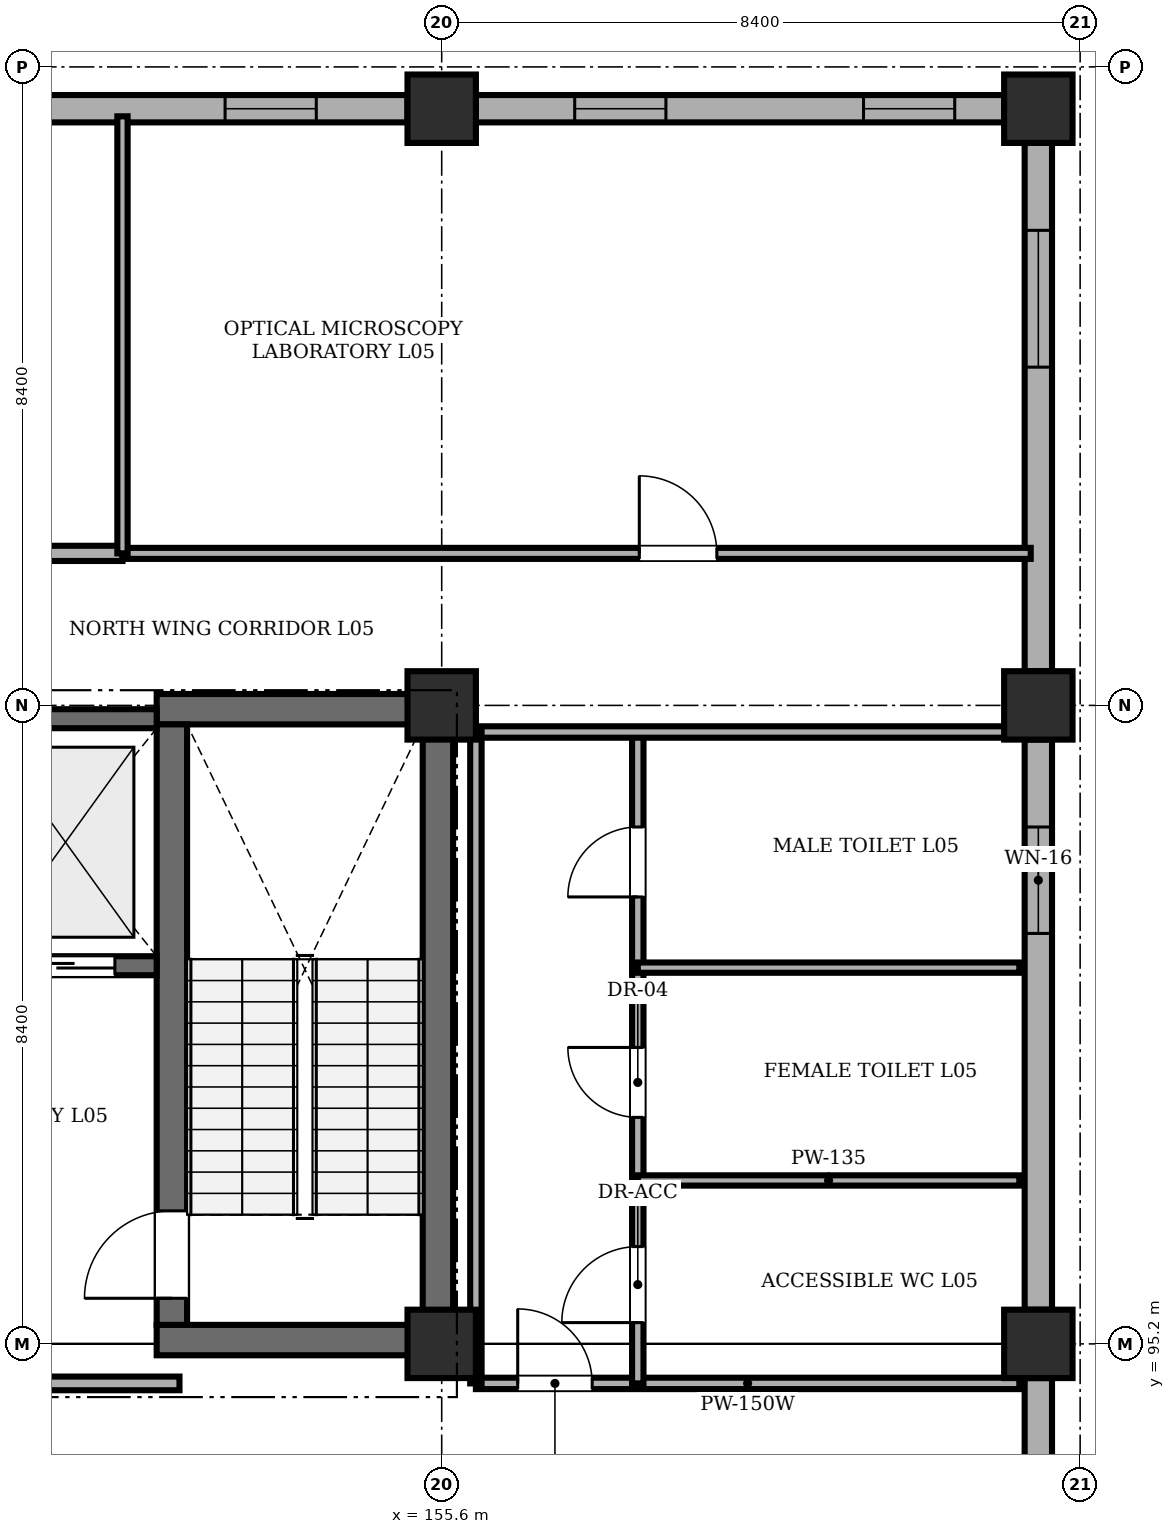
"""IFC4 building model, lengths in metres.
Left out: names, types, materials, properties, quantities, classifications, styles, units other than length and angle.
Written with IfcOpenShell. Run it as: python <this file> out.ifc"""

import sys

from ifc_helpers import new_model, si_unit, direction, frame, frame_2d, origin, origin_2d, place, context, subcontext, project, spatial, rectangle, extrude, element, fill, save


model = new_model("IFC4")
c1 = context("Model", 3, precision=1e-05, world=origin(), true_north=direction((0.0, 1.0)))
c2 = subcontext(c1, "Body", "Model", "MODEL_VIEW")
j1 = project(units=[si_unit("LENGTHUNIT", "METRE"), si_unit("PLANEANGLEUNIT", "RADIAN")], contexts=[c1])
p1 = place(None, origin())
s1 = spatial("IfcSite", under=j1, at=p1, CompositionType="ELEMENT")
p2 = place(p1, origin())
s2 = spatial("IfcBuilding", under=s1, at=p2, CompositionType="ELEMENT")
p3 = place(p2, frame((0.0, 0.0, 19.2)))
s3 = spatial("IfcBuildingStorey", under=s2, at=p3, CompositionType="ELEMENT", Elevation=19.2)
for number, where, z_axis, x_axis in (
    (1, (155.6, 95.2, 0.0), (0.0, 0.0, 1.0), (1.0, 0.0, 0.0)),
    (2, (155.6, 103.6, 0.0), (0.0, 0.0, 1.0), (1.0, 0.0, 0.0)),
    (3, (155.6, 111.45, 0.0), (0.0, 0.0, 1.0), (1.0, 0.0, 0.0)),
    (4, (163.45, 95.2, 0.0), (0.0, 0.0, 1.0), (1.0, 0.0, 0.0)),
    (5, (163.45, 103.6, 0.0), (0.0, 0.0, 1.0), (1.0, 0.0, 0.0)),
    (6, (163.45, 111.45, 0.0), (0.0, 0.0, 1.0), (1.0, 0.0, 0.0)),
):
    element("IfcColumn", number, at=place(p3, frame(where, z_axis=z_axis, x_axis=x_axis)), inside=s3, PredefinedType="COLUMN", context=c2, shape_type="SweptSolid", body=[
        extrude(rectangle(XDim=0.9, YDim=0.9, at=origin_2d()), origin(), (0.0, 0.0, 1.0), 4.02),
    ])
for number, where, z_axis, x_axis in (
    (7, (151.85, 95.25, 0.0), (0.0, 0.0, 1.0), (1.0, 0.0, 0.0)),
    (8, (151.85, 103.55, 0.0), (0.0, 0.0, 1.0), (1.0, 0.0, 0.0)),
):
    element("IfcWall", number, at=place(p3, frame(where, z_axis=z_axis, x_axis=x_axis)), inside=s3, PredefinedType="SHEAR", context=c2, shape_type="SweptSolid", body=[
        extrude(rectangle(XDim=3.9, YDim=0.4, at=frame_2d((1.95, 0.0))), origin(), (0.0, 0.0, 1.0), 4.02),
    ])
p4 = place(p3, frame((152.05, 95.45, 0.0), z_axis=(0.0, 0.0, 1.0), x_axis=(0.0, 1.0, 0.0)))
e9 = element("IfcWall", 9, at=p4, inside=s3, PredefinedType="SHEAR", context=c2, shape_type="SweptSolid", body=[
    extrude(rectangle(XDim=7.9, YDim=0.4, at=frame_2d((3.95, 0.0))), origin(), (0.0, 0.0, 1.0), 4.02),
])
p5 = place(p4, frame((0.35, 0.0, 0.0)))
e10 = element("IfcOpeningElement", 10, at=p5, cuts=e9, PredefinedType="OPENING", context=c2, shape_type="SweptSolid", body=[
    extrude(rectangle(XDim=1.15, YDim=2.15, at=frame_2d((0.575, 1.075))), frame((0.0, 0.21, 0.0), z_axis=(0.0, -1.0, 0.0), x_axis=(1.0, 0.0, 0.0)), (0.0, 0.0, 1.0), 0.42),
])
p6 = place(p3, frame((155.55, 95.45, 0.0), z_axis=(0.0, 0.0, 1.0), x_axis=(0.0, 1.0, 0.0)))
e11 = element("IfcWall", 11, at=p6, inside=s3, PredefinedType="SHEAR", context=c2, shape_type="SweptSolid", body=[
    extrude(rectangle(XDim=7.9, YDim=0.4, at=frame_2d((3.95, 0.0))), origin(), (0.0, 0.0, 1.0), 4.02),
])
p7 = place(p3, frame((149.45, 100.175, 0.0), z_axis=(0.0, 0.0, 1.0), x_axis=(1.0, 0.0, 0.0)))
e12 = element("IfcWall", 12, at=p7, inside=s3, PredefinedType="SHEAR", context=c2, shape_type="SweptSolid", body=[
    extrude(rectangle(XDim=2.4, YDim=0.25, at=frame_2d((1.2, 0.0))), origin(), (0.0, 0.0, 1.0), 4.02),
])
p8 = place(p7, frame((0.55, 0.0, 0.0)))
e13 = element("IfcOpeningElement", 13, at=p8, cuts=e12, PredefinedType="OPENING", context=c2, shape_type="SweptSolid", body=[
    extrude(rectangle(XDim=1.3, YDim=2.25, at=frame_2d((0.65, 1.125))), frame((0.0, 0.135, 0.0), z_axis=(0.0, -1.0, 0.0), x_axis=(1.0, 0.0, 0.0)), (0.0, 0.0, 1.0), 0.27),
])
p9 = place(p3, frame((149.45, 103.425, 0.0), z_axis=(0.0, 0.0, 1.0), x_axis=(1.0, 0.0, 0.0)))
e14 = element("IfcWall", 14, at=p9, inside=s3, PredefinedType="SHEAR", context=c2, shape_type="SweptSolid", body=[
    extrude(rectangle(XDim=2.4, YDim=0.25, at=frame_2d((1.2, 0.0))), origin(), (0.0, 0.0, 1.0), 4.02),
])
p10 = place(p3, frame((147.65, 111.45, 0.0), z_axis=(0.0, 0.0, 1.0), x_axis=(1.0, 0.0, 0.0)))
e15 = element("IfcWall", 15, at=p10, inside=s3, PredefinedType="STANDARD", context=c2, shape_type="SweptSolid", body=[
    extrude(rectangle(XDim=7.5, YDim=0.36, at=frame_2d((3.75, 0.0))), origin(), (0.0, 0.0, 1.0), 3.32),
])
p11 = place(p10, frame((1.3, 0.0, 1.1)))
e16 = element("IfcOpeningElement", 16, at=p11, cuts=e15, PredefinedType="OPENING", context=c2, shape_type="SweptSolid", body=[
    extrude(rectangle(XDim=1.2, YDim=1.5, at=frame_2d((0.6, 0.75))), frame((0.0, 0.19, 0.0), z_axis=(0.0, -1.0, 0.0), x_axis=(1.0, 0.0, 0.0)), (0.0, 0.0, 1.0), 0.38),
])
p12 = place(p10, frame((5.1, 0.0, 1.1)))
e17 = element("IfcOpeningElement", 17, at=p12, cuts=e15, PredefinedType="OPENING", context=c2, shape_type="SweptSolid", body=[
    extrude(rectangle(XDim=1.2, YDim=1.5, at=frame_2d((0.6, 0.75))), frame((0.0, 0.19, 0.0), z_axis=(0.0, -1.0, 0.0), x_axis=(1.0, 0.0, 0.0)), (0.0, 0.0, 1.0), 0.38),
])
p13 = place(p3, frame((156.05, 111.45, 0.0), z_axis=(0.0, 0.0, 1.0), x_axis=(1.0, 0.0, 0.0)))
e18 = element("IfcWall", 18, at=p13, inside=s3, PredefinedType="STANDARD", context=c2, shape_type="SweptSolid", body=[
    extrude(rectangle(XDim=6.95, YDim=0.36, at=frame_2d((3.475, 0.0))), origin(), (0.0, 0.0, 1.0), 3.32),
])
p14 = place(p13, frame((1.3, 0.0, 1.1)))
e19 = element("IfcOpeningElement", 19, at=p14, cuts=e18, PredefinedType="OPENING", context=c2, shape_type="SweptSolid", body=[
    extrude(rectangle(XDim=1.2, YDim=1.5, at=frame_2d((0.6, 0.75))), frame((0.0, 0.19, 0.0), z_axis=(0.0, -1.0, 0.0), x_axis=(1.0, 0.0, 0.0)), (0.0, 0.0, 1.0), 0.38),
])
p15 = place(p13, frame((5.1, 0.0, 1.1)))
e20 = element("IfcOpeningElement", 20, at=p15, cuts=e18, PredefinedType="OPENING", context=c2, shape_type="SweptSolid", body=[
    extrude(rectangle(XDim=1.2, YDim=1.5, at=frame_2d((0.6, 0.75))), frame((0.0, 0.19, 0.0), z_axis=(0.0, -1.0, 0.0), x_axis=(1.0, 0.0, 0.0)), (0.0, 0.0, 1.0), 0.38),
])
p16 = place(p3, frame((163.45, 94.75, 0.0), z_axis=(0.0, 0.0, 1.0), x_axis=(0.0, -1.0, 0.0)))
e21 = element("IfcWall", 21, at=p16, inside=s3, PredefinedType="STANDARD", context=c2, shape_type="SweptSolid", body=[
    extrude(rectangle(XDim=7.5, YDim=0.36, at=frame_2d((3.75, 0.0))), origin(), (0.0, 0.0, 1.0), 3.32),
])
p17 = place(p16, frame((4.2, 0.0, 1.1)))
e22 = element("IfcOpeningElement", 22, at=p17, cuts=e21, PredefinedType="OPENING", context=c2, shape_type="SweptSolid", body=[
    extrude(rectangle(XDim=1.8, YDim=1.8, at=frame_2d((0.9, 0.9))), frame((0.0, 0.19, 0.0), z_axis=(0.0, -1.0, 0.0), x_axis=(1.0, 0.0, 0.0)), (0.0, 0.0, 1.0), 0.38),
])
p18 = place(p3, frame((163.45, 103.15, 0.0), z_axis=(0.0, 0.0, 1.0), x_axis=(0.0, -1.0, 0.0)))
e23 = element("IfcWall", 23, at=p18, inside=s3, PredefinedType="STANDARD", context=c2, shape_type="SweptSolid", body=[
    extrude(rectangle(XDim=7.5, YDim=0.36, at=frame_2d((3.75, 0.0))), origin(), (0.0, 0.0, 1.0), 3.32),
])
p19 = place(p18, frame((1.15, 0.0, 1.1)))
e24 = element("IfcOpeningElement", 24, at=p19, cuts=e23, PredefinedType="OPENING", context=c2, shape_type="SweptSolid", body=[
    extrude(rectangle(XDim=1.4, YDim=1.4, at=frame_2d((0.7, 0.7))), frame((0.0, 0.19, 0.0), z_axis=(0.0, -1.0, 0.0), x_axis=(1.0, 0.0, 0.0)), (0.0, 0.0, 1.0), 0.38),
])
p20 = place(p3, frame((163.45, 111.0, 0.0), z_axis=(0.0, 0.0, 1.0), x_axis=(0.0, -1.0, 0.0)))
e25 = element("IfcWall", 25, at=p20, inside=s3, PredefinedType="STANDARD", context=c2, shape_type="SweptSolid", body=[
    extrude(rectangle(XDim=6.95, YDim=0.36, at=frame_2d((3.475, 0.0))), origin(), (0.0, 0.0, 1.0), 3.32),
])
p21 = place(p20, frame((1.15, 0.0, 1.1)))
e26 = element("IfcOpeningElement", 26, at=p21, cuts=e25, PredefinedType="OPENING", context=c2, shape_type="SweptSolid", body=[
    extrude(rectangle(XDim=1.8, YDim=1.8, at=frame_2d((0.9, 0.9))), frame((0.0, 0.19, 0.0), z_axis=(0.0, -1.0, 0.0), x_axis=(1.0, 0.0, 0.0)), (0.0, 0.0, 1.0), 0.38),
])
p22 = place(p3, frame((147.3, 94.68, 0.0), z_axis=(0.0, 0.0, 1.0), x_axis=(1.0, 0.0, 0.0)))
e27 = element("IfcWall", 27, at=p22, inside=s3, PredefinedType="STANDARD", context=c2, shape_type="SweptSolid", body=[
    extrude(rectangle(XDim=4.85, YDim=0.18, at=frame_2d((2.425, 0.0))), origin(), (0.0, 0.0, 1.0), 4.02),
])
p23 = place(p22, frame((1.6, 0.0, 0.0)))
e28 = element("IfcOpeningElement", 28, at=p23, cuts=e27, PredefinedType="OPENING", context=c2, shape_type="SweptSolid", body=[
    extrude(rectangle(XDim=1.15, YDim=2.15, at=frame_2d((0.575, 1.075))), frame((0.0, 0.1, 0.0), z_axis=(0.0, -1.0, 0.0), x_axis=(1.0, 0.0, 0.0)), (0.0, 0.0, 1.0), 0.2),
])
p24 = place(p3, frame((156.05, 94.68, 0.0), z_axis=(0.0, 0.0, 1.0), x_axis=(1.0, 0.0, 0.0)))
e29 = element("IfcWall", 29, at=p24, inside=s3, PredefinedType="PARTITIONING", context=c2, shape_type="SweptSolid", body=[
    extrude(rectangle(XDim=7.15, YDim=0.15, at=frame_2d((3.575, 0.0))), origin(), (0.0, 0.0, 1.0), 4.02),
])
p25 = place(p24, frame((0.55, 0.0, 0.0)))
e30 = element("IfcOpeningElement", 30, at=p25, cuts=e29, PredefinedType="OPENING", context=c2, shape_type="SweptSolid", body=[
    extrude(rectangle(XDim=0.98, YDim=2.12, at=frame_2d((0.49, 1.06))), frame((0.0, 0.085, 0.0), z_axis=(0.0, -1.0, 0.0), x_axis=(1.0, 0.0, 0.0)), (0.0, 0.0, 1.0), 0.17),
])
p26 = place(p3, frame((158.18, 94.68, 0.0), z_axis=(0.0, 0.0, 1.0), x_axis=(0.0, 1.0, 0.0)))
e31 = element("IfcWall", 31, at=p26, inside=s3, PredefinedType="PARTITIONING", context=c2, shape_type="SweptSolid", body=[
    extrude(rectangle(XDim=8.57, YDim=0.15, at=frame_2d((4.285, 0.0))), origin(), (0.0, 0.0, 1.0), 4.02),
])
p27 = place(p26, frame((0.8, 0.0, 0.0)))
e32 = element("IfcOpeningElement", 32, at=p27, cuts=e31, PredefinedType="OPENING", context=c2, shape_type="SweptSolid", body=[
    extrude(rectangle(XDim=1.0, YDim=2.12, at=frame_2d((0.5, 1.06))), frame((0.0, 0.085, 0.0), z_axis=(0.0, -1.0, 0.0), x_axis=(1.0, 0.0, 0.0)), (0.0, 0.0, 1.0), 0.17),
])
p28 = place(p26, frame((3.5, 0.0, 0.0)))
e33 = element("IfcOpeningElement", 33, at=p28, cuts=e31, PredefinedType="OPENING", context=c2, shape_type="SweptSolid", body=[
    extrude(rectangle(XDim=0.92, YDim=2.1, at=frame_2d((0.46, 1.05))), frame((0.0, 0.085, 0.0), z_axis=(0.0, -1.0, 0.0), x_axis=(1.0, 0.0, 0.0)), (0.0, 0.0, 1.0), 0.17),
])
p29 = place(p26, frame((6.4, 0.0, 0.0)))
e34 = element("IfcOpeningElement", 34, at=p29, cuts=e31, PredefinedType="OPENING", context=c2, shape_type="SweptSolid", body=[
    extrude(rectangle(XDim=0.92, YDim=2.1, at=frame_2d((0.46, 1.05))), frame((0.0, 0.085, 0.0), z_axis=(0.0, -1.0, 0.0), x_axis=(1.0, 0.0, 0.0)), (0.0, 0.0, 1.0), 0.17),
])
for number, where, z_axis, x_axis in (
    (35, (158.18, 97.35, 0.0), (0.0, 0.0, 1.0), (1.0, 0.0, 0.0)),
    (36, (158.18, 100.15, 0.0), (0.0, 0.0, 1.0), (1.0, 0.0, 0.0)),
):
    element("IfcWall", number, at=place(p3, frame(where, z_axis=z_axis, x_axis=x_axis)), inside=s3, PredefinedType="PARTITIONING", context=c2, shape_type="SweptSolid", body=[
        extrude(rectangle(XDim=5.02, YDim=0.135, at=frame_2d((2.51, 0.0))), origin(), (0.0, 0.0, 1.0), 4.02),
    ])
p30 = place(p3, frame((156.05, 103.25, 0.0), z_axis=(0.0, 0.0, 1.0), x_axis=(1.0, 0.0, 0.0)))
e37 = element("IfcWall", 37, at=p30, inside=s3, PredefinedType="PARTITIONING", context=c2, shape_type="SweptSolid", body=[
    extrude(rectangle(XDim=7.15, YDim=0.15, at=frame_2d((3.575, 0.0))), origin(), (0.0, 0.0, 1.0), 4.02),
])
p31 = place(p3, frame((156.05, 94.68, 0.0), z_axis=(0.0, 0.0, 1.0), x_axis=(0.0, 1.0, 0.0)))
e38 = element("IfcWall", 38, at=p31, inside=s3, PredefinedType="PARTITIONING", context=c2, shape_type="SweptSolid", body=[
    extrude(rectangle(XDim=8.57, YDim=0.15, at=frame_2d((4.285, 0.0))), origin(), (0.0, 0.0, 1.0), 4.02),
])
p32 = place(p3, frame((134.6, 105.6, 0.0), z_axis=(0.0, 0.0, 1.0), x_axis=(1.0, 0.0, 0.0)))
e39 = element("IfcWall", 39, at=p32, inside=s3, PredefinedType="SOLIDWALL", context=c2, shape_type="SweptSolid", body=[
    extrude(rectangle(XDim=16.8, YDim=0.2, at=frame_2d((8.4, 0.0))), origin(), (0.0, 0.0, 1.0), 4.02),
])
p33 = place(p32, frame((6.8, 0.0, 0.0)))
e40 = element("IfcOpeningElement", 40, at=p33, cuts=e39, PredefinedType="OPENING", context=c2, shape_type="SweptSolid", body=[
    extrude(rectangle(XDim=1.5, YDim=2.2, at=frame_2d((0.75, 1.1))), frame((0.0, 0.11, 0.0), z_axis=(0.0, -1.0, 0.0), x_axis=(1.0, 0.0, 0.0)), (0.0, 0.0, 1.0), 0.22),
])
p34 = place(p3, frame((151.4, 105.6, 0.0), z_axis=(0.0, 0.0, 1.0), x_axis=(1.0, 0.0, 0.0)))
e41 = element("IfcWall", 41, at=p34, inside=s3, PredefinedType="PARTITIONING", context=c2, shape_type="SweptSolid", body=[
    extrude(rectangle(XDim=11.95, YDim=0.145, at=frame_2d((5.975, 0.0))), origin(), (0.0, 0.0, 1.0), 4.02),
])
p35 = place(p34, frame((6.8, 0.0, 0.0)))
e42 = element("IfcOpeningElement", 42, at=p35, cuts=e41, PredefinedType="OPENING", context=c2, shape_type="SweptSolid", body=[
    extrude(rectangle(XDim=1.02, YDim=2.15, at=frame_2d((0.51, 1.075))), frame((0.0, 0.083, 0.0), z_axis=(0.0, -1.0, 0.0), x_axis=(1.0, 0.0, 0.0)), (0.0, 0.0, 1.0), 0.165),
])
p36 = place(p3, frame((151.4, 105.6, 0.0), z_axis=(0.0, 0.0, 1.0), x_axis=(0.0, 1.0, 0.0)))
e43 = element("IfcWall", 43, at=p36, inside=s3, PredefinedType="PARTITIONING", context=c2, shape_type="SweptSolid", body=[
    extrude(rectangle(XDim=5.75, YDim=0.135, at=frame_2d((2.875, 0.0))), origin(), (0.0, 0.0, 1.0), 3.52),
])
p37 = place(p12, origin())
e44 = element("IfcWindow", 44, at=p37, inside=s3, PartitioningType="SINGLE_PANEL", PredefinedType="WINDOW", context=c2, shape_type="SweptSolid", body=[
    extrude(rectangle(XDim=1.2, YDim=1.5, at=frame_2d((0.6, 0.75))), frame((0.0, 0.03, 0.0), z_axis=(0.0, -1.0, 0.0), x_axis=(1.0, 0.0, 0.0)), (0.0, 0.0, 1.0), 0.06),
])
fill(e17, e44)
p38 = place(p14, origin())
e45 = element("IfcWindow", 45, at=p38, inside=s3, PartitioningType="SINGLE_PANEL", PredefinedType="WINDOW", context=c2, shape_type="SweptSolid", body=[
    extrude(rectangle(XDim=1.2, YDim=1.5, at=frame_2d((0.6, 0.75))), frame((0.0, 0.03, 0.0), z_axis=(0.0, -1.0, 0.0), x_axis=(1.0, 0.0, 0.0)), (0.0, 0.0, 1.0), 0.06),
])
fill(e19, e45)
p39 = place(p15, origin())
e46 = element("IfcWindow", 46, at=p39, inside=s3, PartitioningType="SINGLE_PANEL", PredefinedType="WINDOW", context=c2, shape_type="SweptSolid", body=[
    extrude(rectangle(XDim=1.2, YDim=1.5, at=frame_2d((0.6, 0.75))), frame((0.0, 0.03, 0.0), z_axis=(0.0, -1.0, 0.0), x_axis=(1.0, 0.0, 0.0)), (0.0, 0.0, 1.0), 0.06),
])
fill(e20, e46)
p40 = place(p19, origin())
e47 = element("IfcWindow", 47, at=p40, inside=s3, PartitioningType="SINGLE_PANEL", PredefinedType="WINDOW", context=c2, shape_type="SweptSolid", body=[
    extrude(rectangle(XDim=1.4, YDim=1.4, at=frame_2d((0.7, 0.7))), frame((0.0, 0.03, 0.0), z_axis=(0.0, -1.0, 0.0), x_axis=(1.0, 0.0, 0.0)), (0.0, 0.0, 1.0), 0.06),
])
fill(e24, e47)
p41 = place(p21, origin())
e48 = element("IfcWindow", 48, at=p41, inside=s3, PartitioningType="DOUBLE_PANEL_VERTICAL", PredefinedType="WINDOW", context=c2, shape_type="SweptSolid", body=[
    extrude(rectangle(XDim=1.8, YDim=1.8, at=frame_2d((0.9, 0.9))), frame((0.0, 0.03, 0.0), z_axis=(0.0, -1.0, 0.0), x_axis=(1.0, 0.0, 0.0)), (0.0, 0.0, 1.0), 0.06),
])
fill(e26, e48)
p42 = place(p25, origin())
e49 = element("IfcDoor", 49, at=p42, inside=s3, OperationType="SINGLE_SWING_LEFT", PredefinedType="DOOR", context=c2, shape_type="SweptSolid", body=[
    extrude(rectangle(XDim=0.98, YDim=2.12, at=frame_2d((0.49, 1.06))), frame((0.0, 0.025, 0.0), z_axis=(0.0, -1.0, 0.0), x_axis=(1.0, 0.0, 0.0)), (0.0, 0.0, 1.0), 0.05),
])
fill(e30, e49)
p43 = place(p27, origin())
e50 = element("IfcDoor", 50, at=p43, inside=s3, OperationType="SINGLE_SWING_LEFT", PredefinedType="DOOR", context=c2, shape_type="SweptSolid", body=[
    extrude(rectangle(XDim=1.0, YDim=2.12, at=frame_2d((0.5, 1.06))), frame((0.0, 0.025, 0.0), z_axis=(0.0, -1.0, 0.0), x_axis=(1.0, 0.0, 0.0)), (0.0, 0.0, 1.0), 0.05),
])
fill(e32, e50)
p44 = place(p28, origin())
e51 = element("IfcDoor", 51, at=p44, inside=s3, OperationType="SINGLE_SWING_RIGHT", PredefinedType="DOOR", context=c2, shape_type="SweptSolid", body=[
    extrude(rectangle(XDim=0.92, YDim=2.1, at=frame_2d((0.46, 1.05))), frame((0.0, 0.025, 0.0), z_axis=(0.0, -1.0, 0.0), x_axis=(1.0, 0.0, 0.0)), (0.0, 0.0, 1.0), 0.05),
])
fill(e33, e51)
p45 = place(p29, origin())
e52 = element("IfcDoor", 52, at=p45, inside=s3, OperationType="SINGLE_SWING_LEFT", PredefinedType="DOOR", context=c2, shape_type="SweptSolid", body=[
    extrude(rectangle(XDim=0.92, YDim=2.1, at=frame_2d((0.46, 1.05))), frame((0.0, 0.025, 0.0), z_axis=(0.0, -1.0, 0.0), x_axis=(1.0, 0.0, 0.0)), (0.0, 0.0, 1.0), 0.05),
])
fill(e34, e52)
p46 = place(p35, origin())
e53 = element("IfcDoor", 53, at=p46, inside=s3, OperationType="SINGLE_SWING_LEFT", PredefinedType="DOOR", context=c2, shape_type="SweptSolid", body=[
    extrude(rectangle(XDim=1.02, YDim=2.15, at=frame_2d((0.51, 1.075))), frame((0.0, 0.025, 0.0), z_axis=(0.0, -1.0, 0.0), x_axis=(1.0, 0.0, 0.0)), (0.0, 0.0, 1.0), 0.05),
])
fill(e42, e53)
p47 = place(p5, origin())
e54 = element("IfcDoor", 54, at=p47, inside=s3, OperationType="SINGLE_SWING_LEFT", PredefinedType="DOOR", context=c2, shape_type="SweptSolid", body=[
    extrude(rectangle(XDim=1.15, YDim=2.15, at=frame_2d((0.575, 1.075))), frame((0.0, 0.025, 0.0), z_axis=(0.0, -1.0, 0.0), x_axis=(1.0, 0.0, 0.0)), (0.0, 0.0, 1.0), 0.05),
])
fill(e10, e54)
p48 = place(p8, origin())
e55 = element("IfcDoor", 55, at=p48, inside=s3, OperationType="SLIDING_TO_LEFT", PredefinedType="DOOR", context=c2, shape_type="SweptSolid", body=[
    extrude(rectangle(XDim=1.3, YDim=2.25, at=frame_2d((0.65, 1.125))), frame((0.0, 0.025, 0.0), z_axis=(0.0, -1.0, 0.0), x_axis=(1.0, 0.0, 0.0)), (0.0, 0.0, 1.0), 0.05),
])
fill(e13, e55)
save(model, sys.argv[1])
